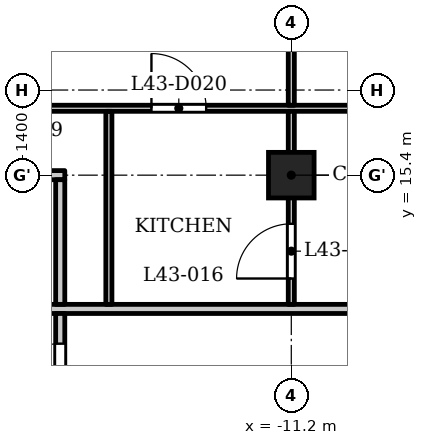
"""IFC4 building model, lengths in metres.
Left out: names, types, materials, properties, quantities, classifications, styles, units other than length and angle.
Written with IfcOpenShell. Run it as: python <this file> out.ifc"""

import sys

from ifc_helpers import new_model, si_unit, direction, frame, frame_2d, origin, origin_2d, place, context, subcontext, project, spatial, rectangle, extrude, element, fill, save


model = new_model("IFC4")
c1 = context("Model", 3, precision=1e-05, world=origin(), true_north=direction((0.0, 1.0)))
c2 = subcontext(c1, "Body", "Model", "MODEL_VIEW")
j1 = project(units=[si_unit("LENGTHUNIT", "METRE"), si_unit("PLANEANGLEUNIT", "RADIAN")], contexts=[c1])
p1 = place(None, origin())
s1 = spatial("IfcSite", under=j1, at=p1, CompositionType="ELEMENT")
p2 = place(p1, origin())
s2 = spatial("IfcBuilding", under=s1, at=p2, CompositionType="ELEMENT")
p3 = place(p2, frame((0.0, 0.0, 167.6)))
s3 = spatial("IfcBuildingStorey", under=s2, at=p3, CompositionType="ELEMENT", Elevation=167.6)
p4 = place(p3, frame((-11.2, 15.4, 0.0), z_axis=(0.0, 0.0, 1.0), x_axis=(1.0, 0.0, 0.0)))
e1 = element("IfcColumn", 1, at=p4, inside=s3, PredefinedType="COLUMN", context=c2, shape_type="SweptSolid", body=[
    extrude(rectangle(XDim=0.75, YDim=0.75, at=origin_2d()), origin(), (0.0, 0.0, 1.0), 3.5),
])
p5 = place(p3, frame((-17.4, 13.2, 0.0), z_axis=(0.0, 0.0, 1.0), x_axis=(1.0, 0.0, 0.0)))
e2 = element("IfcWall", 2, at=p5, inside=s3, PredefinedType="PARTITIONING", context=c2, shape_type="SweptSolid", body=[
    extrude(rectangle(XDim=34.8, YDim=0.15, at=frame_2d((17.4, 0.0))), origin(), (0.0, 0.0, 1.0), 3.2),
])
p6 = place(p5, frame((0.25, 0.0, 0.0)))
e3 = element("IfcOpeningElement", 3, at=p6, cuts=e2, PredefinedType="OPENING", context=c2, shape_type="SweptSolid", body=[
    extrude(rectangle(XDim=1.0, YDim=2.1, at=frame_2d((0.5, 1.05))), frame((0.0, 0.085, 0.0), z_axis=(0.0, -1.0, 0.0), x_axis=(1.0, 0.0, 0.0)), (0.0, 0.0, 1.0), 0.17),
])
p7 = place(p5, frame((33.65, 0.0, 0.0)))
e4 = element("IfcOpeningElement", 4, at=p7, cuts=e2, PredefinedType="OPENING", context=c2, shape_type="SweptSolid", body=[
    extrude(rectangle(XDim=1.0, YDim=2.1, at=frame_2d((0.5, 1.05))), frame((0.0, 0.085, 0.0), z_axis=(0.0, -1.0, 0.0), x_axis=(1.0, 0.0, 0.0)), (0.0, 0.0, 1.0), 0.17),
])
p8 = place(p5, frame((10.15, 0.0, 0.0)))
e5 = element("IfcOpeningElement", 5, at=p8, cuts=e2, PredefinedType="OPENING", context=c2, shape_type="SweptSolid", body=[
    extrude(rectangle(XDim=1.0, YDim=2.1, at=frame_2d((0.5, 1.05))), frame((0.0, 0.085, 0.0), z_axis=(0.0, -1.0, 0.0), x_axis=(1.0, 0.0, 0.0)), (0.0, 0.0, 1.0), 0.17),
])
p9 = place(p5, frame((15.75, 0.0, 0.0)))
e6 = element("IfcOpeningElement", 6, at=p9, cuts=e2, PredefinedType="OPENING", context=c2, shape_type="SweptSolid", body=[
    extrude(rectangle(XDim=1.0, YDim=2.1, at=frame_2d((0.5, 1.05))), frame((0.0, 0.085, 0.0), z_axis=(0.0, -1.0, 0.0), x_axis=(1.0, 0.0, 0.0)), (0.0, 0.0, 1.0), 0.17),
])
p10 = place(p5, frame((24.95, 0.0, 0.0)))
e7 = element("IfcOpeningElement", 7, at=p10, cuts=e2, PredefinedType="OPENING", context=c2, shape_type="SweptSolid", body=[
    extrude(rectangle(XDim=1.0, YDim=2.1, at=frame_2d((0.5, 1.05))), frame((0.0, 0.085, 0.0), z_axis=(0.0, -1.0, 0.0), x_axis=(1.0, 0.0, 0.0)), (0.0, 0.0, 1.0), 0.17),
])
p11 = place(p5, frame((29.95, 0.0, 0.0)))
e8 = element("IfcOpeningElement", 8, at=p11, cuts=e2, PredefinedType="OPENING", context=c2, shape_type="SweptSolid", body=[
    extrude(rectangle(XDim=1.0, YDim=2.1, at=frame_2d((0.5, 1.05))), frame((0.0, 0.085, 0.0), z_axis=(0.0, -1.0, 0.0), x_axis=(1.0, 0.0, 0.0)), (0.0, 0.0, 1.0), 0.17),
])
p12 = place(p3, frame((-27.484, 15.4, 0.0), z_axis=(0.0, 0.0, 1.0), x_axis=(1.0, 0.0, 0.0)))
e9 = element("IfcWall", 9, at=p12, inside=s3, PredefinedType="PARTITIONING", context=c2, shape_type="SweptSolid", body=[
    extrude(rectangle(XDim=12.559, YDim=0.15, at=frame_2d((6.279, 0.0))), origin(), (0.0, 0.0, 1.0), 3.2),
])
p13 = place(p12, frame((5.784, 0.0, 0.0)))
e10 = element("IfcOpeningElement", 10, at=p13, cuts=e9, PredefinedType="OPENING", context=c2, shape_type="SweptSolid", body=[
    extrude(rectangle(XDim=1.0, YDim=2.1, at=frame_2d((0.5, 1.05))), frame((0.0, 0.085, 0.0), z_axis=(0.0, -1.0, 0.0), x_axis=(1.0, 0.0, 0.0)), (0.0, 0.0, 1.0), 0.17),
])
p14 = place(p3, frame((-16.725, 16.5, 0.0), z_axis=(0.0, 0.0, 1.0), x_axis=(1.0, 0.0, 0.0)))
e11 = element("IfcWall", 11, at=p14, inside=s3, PredefinedType="PARTITIONING", context=c2, shape_type="SweptSolid", body=[
    extrude(rectangle(XDim=33.45, YDim=0.1, at=frame_2d((16.725, 0.0))), origin(), (0.0, 0.0, 1.0), 3.2),
])
p15 = place(p14, frame((0.575, 0.0, 0.0)))
e12 = element("IfcOpeningElement", 12, at=p15, cuts=e11, PredefinedType="OPENING", context=c2, shape_type="SweptSolid", body=[
    extrude(rectangle(XDim=0.8, YDim=2.1, at=frame_2d((0.4, 1.05))), frame((0.0, 0.06, 0.0), z_axis=(0.0, -1.0, 0.0), x_axis=(1.0, 0.0, 0.0)), (0.0, 0.0, 1.0), 0.12),
])
p16 = place(p14, frame((3.225, 0.0, 0.0)))
e13 = element("IfcOpeningElement", 13, at=p16, cuts=e11, PredefinedType="OPENING", context=c2, shape_type="SweptSolid", body=[
    extrude(rectangle(XDim=0.9, YDim=2.1, at=frame_2d((0.45, 1.05))), frame((0.0, 0.06, 0.0), z_axis=(0.0, -1.0, 0.0), x_axis=(1.0, 0.0, 0.0)), (0.0, 0.0, 1.0), 0.12),
])
p17 = place(p14, frame((6.775, 0.0, 0.0)))
e14 = element("IfcOpeningElement", 14, at=p17, cuts=e11, PredefinedType="OPENING", context=c2, shape_type="SweptSolid", body=[
    extrude(rectangle(XDim=0.9, YDim=2.1, at=frame_2d((0.45, 1.05))), frame((0.0, 0.06, 0.0), z_axis=(0.0, -1.0, 0.0), x_axis=(1.0, 0.0, 0.0)), (0.0, 0.0, 1.0), 0.12),
])
p18 = place(p14, frame((8.825, 0.0, 0.0)))
e15 = element("IfcOpeningElement", 15, at=p18, cuts=e11, PredefinedType="OPENING", context=c2, shape_type="SweptSolid", body=[
    extrude(rectangle(XDim=0.9, YDim=2.1, at=frame_2d((0.45, 1.05))), frame((0.0, 0.06, 0.0), z_axis=(0.0, -1.0, 0.0), x_axis=(1.0, 0.0, 0.0)), (0.0, 0.0, 1.0), 0.12),
])
p19 = place(p14, frame((20.775, 0.0, 0.0)))
e16 = element("IfcOpeningElement", 16, at=p19, cuts=e11, PredefinedType="OPENING", context=c2, shape_type="SweptSolid", body=[
    extrude(rectangle(XDim=0.8, YDim=2.1, at=frame_2d((0.4, 1.05))), frame((0.0, 0.06, 0.0), z_axis=(0.0, -1.0, 0.0), x_axis=(1.0, 0.0, 0.0)), (0.0, 0.0, 1.0), 0.12),
])
p20 = place(p14, frame((17.325, 0.0, 0.0)))
e17 = element("IfcOpeningElement", 17, at=p20, cuts=e11, PredefinedType="OPENING", context=c2, shape_type="SweptSolid", body=[
    extrude(rectangle(XDim=0.9, YDim=2.1, at=frame_2d((0.45, 1.05))), frame((0.0, 0.06, 0.0), z_axis=(0.0, -1.0, 0.0), x_axis=(1.0, 0.0, 0.0)), (0.0, 0.0, 1.0), 0.12),
])
p21 = place(p14, frame((12.375, 0.0, 0.0)))
e18 = element("IfcOpeningElement", 18, at=p21, cuts=e11, PredefinedType="OPENING", context=c2, shape_type="SweptSolid", body=[
    extrude(rectangle(XDim=0.9, YDim=2.1, at=frame_2d((0.45, 1.05))), frame((0.0, 0.06, 0.0), z_axis=(0.0, -1.0, 0.0), x_axis=(1.0, 0.0, 0.0)), (0.0, 0.0, 1.0), 0.12),
])
p22 = place(p14, frame((14.425, 0.0, 0.0)))
e19 = element("IfcOpeningElement", 19, at=p22, cuts=e11, PredefinedType="OPENING", context=c2, shape_type="SweptSolid", body=[
    extrude(rectangle(XDim=0.9, YDim=2.1, at=frame_2d((0.45, 1.05))), frame((0.0, 0.06, 0.0), z_axis=(0.0, -1.0, 0.0), x_axis=(1.0, 0.0, 0.0)), (0.0, 0.0, 1.0), 0.12),
])
p23 = place(p14, frame((26.575, 0.0, 0.0)))
e20 = element("IfcOpeningElement", 20, at=p23, cuts=e11, PredefinedType="OPENING", context=c2, shape_type="SweptSolid", body=[
    extrude(rectangle(XDim=0.8, YDim=2.1, at=frame_2d((0.4, 1.05))), frame((0.0, 0.06, 0.0), z_axis=(0.0, -1.0, 0.0), x_axis=(1.0, 0.0, 0.0)), (0.0, 0.0, 1.0), 0.12),
])
p24 = place(p14, frame((23.775, 0.0, 0.0)))
e21 = element("IfcOpeningElement", 21, at=p24, cuts=e11, PredefinedType="OPENING", context=c2, shape_type="SweptSolid", body=[
    extrude(rectangle(XDim=0.9, YDim=2.1, at=frame_2d((0.45, 1.05))), frame((0.0, 0.06, 0.0), z_axis=(0.0, -1.0, 0.0), x_axis=(1.0, 0.0, 0.0)), (0.0, 0.0, 1.0), 0.12),
])
p25 = place(p14, frame((32.075, 0.0, 0.0)))
e22 = element("IfcOpeningElement", 22, at=p25, cuts=e11, PredefinedType="OPENING", context=c2, shape_type="SweptSolid", body=[
    extrude(rectangle(XDim=0.8, YDim=2.1, at=frame_2d((0.4, 1.05))), frame((0.0, 0.06, 0.0), z_axis=(0.0, -1.0, 0.0), x_axis=(1.0, 0.0, 0.0)), (0.0, 0.0, 1.0), 0.12),
])
p26 = place(p14, frame((29.375, 0.0, 0.0)))
e23 = element("IfcOpeningElement", 23, at=p26, cuts=e11, PredefinedType="OPENING", context=c2, shape_type="SweptSolid", body=[
    extrude(rectangle(XDim=0.9, YDim=2.1, at=frame_2d((0.45, 1.05))), frame((0.0, 0.06, 0.0), z_axis=(0.0, -1.0, 0.0), x_axis=(1.0, 0.0, 0.0)), (0.0, 0.0, 1.0), 0.12),
])
p27 = place(p3, frame((-15.0, 6.769, 0.0), z_axis=(0.0, 0.0, 1.0), x_axis=(0.0, 1.0, 0.0)))
e24 = element("IfcWall", 24, at=p27, inside=s3, PredefinedType="PARTITIONING", context=c2, shape_type="SweptSolid", body=[
    extrude(rectangle(XDim=6.356, YDim=0.15, at=frame_2d((3.178, 0.0))), origin(), (0.0, 0.0, 1.0), 3.2),
])
p28 = place(p27, frame((4.86, 0.0, 0.0)))
e25 = element("IfcOpeningElement", 25, at=p28, cuts=e24, PredefinedType="OPENING", context=c2, shape_type="SweptSolid", body=[
    extrude(rectangle(XDim=1.0, YDim=2.1, at=frame_2d((0.5, 1.05))), frame((0.0, 0.085, 0.0), z_axis=(0.0, -1.0, 0.0), x_axis=(1.0, 0.0, 0.0)), (0.0, 0.0, 1.0), 0.17),
])
p29 = place(p3, frame((-15.0, 13.275, 0.0), z_axis=(0.0, 0.0, 1.0), x_axis=(0.0, 1.0, 0.0)))
e26 = element("IfcWall", 26, at=p29, inside=s3, PredefinedType="PARTITIONING", context=c2, shape_type="SweptSolid", body=[
    extrude(rectangle(XDim=2.05, YDim=0.15, at=frame_2d((1.025, 0.0))), origin(), (0.0, 0.0, 1.0), 3.2),
])
p30 = place(p3, frame((-14.2, 13.275, 0.0), z_axis=(0.0, 0.0, 1.0), x_axis=(0.0, 1.0, 0.0)))
e27 = element("IfcWall", 27, at=p30, inside=s3, PredefinedType="PARTITIONING", context=c2, shape_type="SweptSolid", body=[
    extrude(rectangle(XDim=3.175, YDim=0.1, at=frame_2d((1.587, 0.0))), origin(), (0.0, 0.0, 1.0), 3.2),
])
p31 = place(p3, frame((-11.2, 13.275, 0.0), z_axis=(0.0, 0.0, 1.0), x_axis=(0.0, 1.0, 0.0)))
e28 = element("IfcWall", 28, at=p31, inside=s3, PredefinedType="PARTITIONING", context=c2, shape_type="SweptSolid", body=[
    extrude(rectangle(XDim=3.175, YDim=0.1, at=frame_2d((1.587, 0.0))), origin(), (0.0, 0.0, 1.0), 3.2),
])
p32 = place(p31, frame((0.425, 0.0, 0.0)))
e29 = element("IfcOpeningElement", 29, at=p32, cuts=e28, PredefinedType="OPENING", context=c2, shape_type="SweptSolid", body=[
    extrude(rectangle(XDim=0.9, YDim=2.1, at=frame_2d((0.45, 1.05))), frame((0.0, 0.06, 0.0), z_axis=(0.0, -1.0, 0.0), x_axis=(1.0, 0.0, 0.0)), (0.0, 0.0, 1.0), 0.12),
])
p33 = place(p3, frame((-11.2, 16.55, 0.0), z_axis=(0.0, 0.0, 1.0), x_axis=(0.0, 1.0, 0.0)))
e30 = element("IfcWall", 30, at=p33, inside=s3, PredefinedType="PARTITIONING", context=c2, shape_type="SweptSolid", body=[
    extrude(rectangle(XDim=6.33, YDim=0.1, at=frame_2d((3.165, 0.0))), origin(), (0.0, 0.0, 1.0), 3.2),
])
p34 = place(p28, origin())
e31 = element("IfcDoor", 31, at=p34, inside=s3, OperationType="SINGLE_SWING_RIGHT", PredefinedType="DOOR", context=c2, shape_type="SweptSolid", body=[
    extrude(rectangle(XDim=1.0, YDim=2.1, at=frame_2d((0.5, 1.05))), frame((0.0, 0.025, 0.0), z_axis=(0.0, -1.0, 0.0), x_axis=(1.0, 0.0, 0.0)), (0.0, 0.0, 1.0), 0.05),
])
fill(e25, e31)
p35 = place(p32, origin())
e32 = element("IfcDoor", 32, at=p35, inside=s3, OperationType="SINGLE_SWING_RIGHT", PredefinedType="DOOR", context=c2, shape_type="SweptSolid", body=[
    extrude(rectangle(XDim=0.9, YDim=2.1, at=frame_2d((0.45, 1.05))), frame((0.0, 0.025, 0.0), z_axis=(0.0, -1.0, 0.0), x_axis=(1.0, 0.0, 0.0)), (0.0, 0.0, 1.0), 0.05),
])
fill(e29, e32)
p36 = place(p16, origin())
e33 = element("IfcDoor", 33, at=p36, inside=s3, OperationType="SINGLE_SWING_RIGHT", PredefinedType="DOOR", context=c2, shape_type="SweptSolid", body=[
    extrude(rectangle(XDim=0.9, YDim=2.1, at=frame_2d((0.45, 1.05))), frame((0.0, 0.025, 0.0), z_axis=(0.0, -1.0, 0.0), x_axis=(1.0, 0.0, 0.0)), (0.0, 0.0, 1.0), 0.05),
])
fill(e13, e33)
save(model, sys.argv[1])
